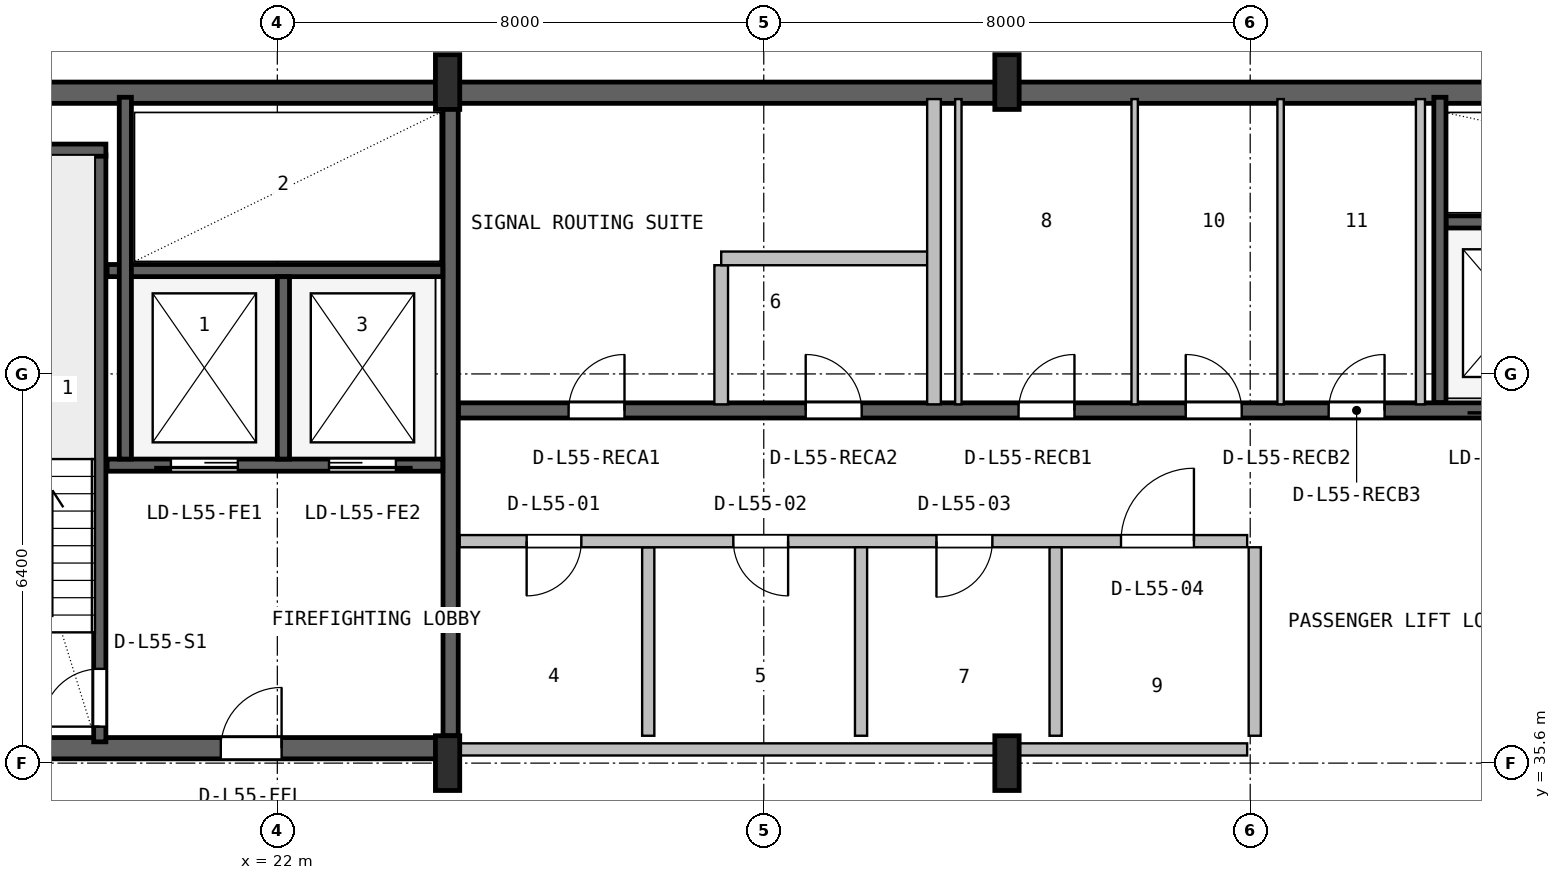
"""IFC4 building model, lengths in metres.
Left out: names, types, materials, properties, quantities, classifications, styles, units other than length and angle.
Written with IfcOpenShell. Run it as: python <this file> out.ifc"""

import sys

from ifc_helpers import new_model, si_unit, direction, frame, frame_2d, origin, origin_2d, place, context, subcontext, project, spatial, rectangle, i_section, extrude, source, transform, mapped, element, fill, save


model = new_model("IFC4")
c1 = context("Model", 3, precision=1e-05, world=origin(), true_north=direction((0.0, 1.0)))
c2 = subcontext(c1, "Body", "Model", "MODEL_VIEW")
j1 = project(units=[si_unit("LENGTHUNIT", "METRE"), si_unit("PLANEANGLEUNIT", "RADIAN")], contexts=[c1])
p1 = place(None, origin())
s1 = spatial("IfcSite", under=j1, at=p1, CompositionType="ELEMENT")
p2 = place(p1, origin())
s2 = spatial("IfcBuilding", under=s1, at=p2, CompositionType="ELEMENT")
p3 = place(p2, frame((0.0, 0.0, 222.6)))
s3 = spatial("IfcBuildingStorey", under=s2, at=p3, CompositionType="ELEMENT", Elevation=222.6)
p4 = place(p3, frame((15.6, 46.625, 0.0), z_axis=(0.0, 0.0, 1.0), x_axis=(1.0, 0.0, 0.0)))
e1 = element("IfcWall", 1, at=p4, inside=s3, PredefinedType="SHEAR", context=c2, shape_type="SweptSolid", body=[
    extrude(rectangle(XDim=36.8, YDim=0.35, at=frame_2d((18.4, 0.0))), origin(), (0.0, 0.0, 1.0), 3.55),
])
p5 = place(p3, frame((15.67, 35.845, 0.0), z_axis=(0.0, 0.0, 1.0), x_axis=(1.0, 0.0, 0.0)))
e2 = element("IfcWall", 2, at=p5, inside=s3, PredefinedType="SHEAR", context=c2, shape_type="SweptSolid", body=[
    extrude(rectangle(XDim=9.13, YDim=0.35, at=frame_2d((4.565, 0.0))), origin(), (0.0, 0.0, 1.0), 3.55),
])
p6 = place(p5, frame((5.4, 0.0, 0.0)))
e3 = element("IfcOpeningElement", 3, at=p6, cuts=e2, PredefinedType="OPENING", context=c2, shape_type="SweptSolid", body=[
    extrude(rectangle(XDim=1.0, YDim=2.1, at=frame_2d((0.5, 1.05))), frame((0.0, 0.185, 0.0), z_axis=(0.0, -1.0, 0.0), x_axis=(1.0, 0.0, 0.0)), (0.0, 0.0, 1.0), 0.37),
])
m1 = source(origin(), c2, "Body", "SweptSolid", [
    extrude(i_section(OverallWidth=0.4, OverallDepth=0.9, WebThickness=0.016, FlangeThickness=0.028, FilletRadius=0.016, at=origin_2d()), origin(), (0.0, 0.0, 1.0), 3.8),
])
for number, where, z_axis, x_axis in (
    (4, (24.8, 35.6, 0.0), (0.0, 0.0, 1.0), (1.0, 0.0, 0.0)),
    (5, (24.8, 46.8, 0.0), (0.0, 0.0, 1.0), (1.0, 0.0, 0.0)),
    (6, (34.0, 35.6, 0.0), (0.0, 0.0, 1.0), (1.0, 0.0, 0.0)),
    (7, (34.0, 46.8, 0.0), (0.0, 0.0, 1.0), (1.0, 0.0, 0.0)),
):
    element("IfcColumn", number, at=place(p3, frame(where, z_axis=z_axis, x_axis=x_axis)), inside=s3, PredefinedType="COLUMN", context=c2, shape_type="MappedRepresentation", body=[
        mapped(m1, transform((0.0, 0.0, 0.0), x_axis=(1.0, 0.0, 0.0), y_axis=(0.0, 1.0, 0.0), z_axis=(0.0, 0.0, 1.0), scale=1.0)),
    ])
p7 = place(p3, frame((19.08, 35.95, 0.0), z_axis=(0.0, 0.0, 1.0), x_axis=(0.0, 1.0, 0.0)))
e8 = element("IfcWall", 8, at=p7, inside=s3, PredefinedType="SHEAR", context=c2, shape_type="SweptSolid", body=[
    extrude(rectangle(XDim=9.65, YDim=0.2, at=frame_2d((4.825, 0.0))), origin(), (0.0, 0.0, 1.0), 3.55),
])
p8 = place(p7, frame((0.25, 0.0, 0.0)))
e9 = element("IfcOpeningElement", 9, at=p8, cuts=e8, PredefinedType="OPENING", context=c2, shape_type="SweptSolid", body=[
    extrude(rectangle(XDim=0.95, YDim=2.1, at=frame_2d((0.475, 1.05))), frame((0.0, 0.11, 0.0), z_axis=(0.0, -1.0, 0.0), x_axis=(1.0, 0.0, 0.0)), (0.0, 0.0, 1.0), 0.22),
])
p9 = place(p3, frame((15.95, 45.68, 0.0), z_axis=(0.0, 0.0, 1.0), x_axis=(1.0, 0.0, 0.0)))
e10 = element("IfcWall", 10, at=p9, inside=s3, PredefinedType="SHEAR", context=c2, shape_type="SweptSolid", body=[
    extrude(rectangle(XDim=3.23, YDim=0.2, at=frame_2d((1.615, 0.0))), origin(), (0.0, 0.0, 1.0), 3.55),
])
p10 = place(p3, frame((24.85, 36.05, 0.0), z_axis=(0.0, 0.0, 1.0), x_axis=(0.0, 1.0, 0.0)))
e11 = element("IfcWall", 11, at=p10, inside=s3, PredefinedType="SHEAR", context=c2, shape_type="SweptSolid", body=[
    extrude(rectangle(XDim=10.45, YDim=0.25, at=frame_2d((5.225, 0.0))), origin(), (0.0, 0.0, 1.0), 3.55),
])
p11 = place(p3, frame((19.2, 40.5, 0.0), z_axis=(0.0, 0.0, 1.0), x_axis=(1.0, 0.0, 0.0)))
e12 = element("IfcWall", 12, at=p11, inside=s3, PredefinedType="SHEAR", context=c2, shape_type="SweptSolid", body=[
    extrude(rectangle(XDim=5.52, YDim=0.2, at=frame_2d((2.76, 0.0))), origin(), (0.0, 0.0, 1.0), 3.55),
])
p12 = place(p11, frame((1.05, 0.0, 0.0)))
e13 = element("IfcOpeningElement", 13, at=p12, cuts=e12, PredefinedType="OPENING", context=c2, shape_type="SweptSolid", body=[
    extrude(rectangle(XDim=1.1, YDim=2.18, at=frame_2d((0.55, 1.09))), frame((0.0, 0.11, 0.0), z_axis=(0.0, -1.0, 0.0), x_axis=(1.0, 0.0, 0.0)), (0.0, 0.0, 1.0), 0.22),
])
p13 = place(p11, frame((3.65, 0.0, 0.0)))
e14 = element("IfcOpeningElement", 14, at=p13, cuts=e12, PredefinedType="OPENING", context=c2, shape_type="SweptSolid", body=[
    extrude(rectangle(XDim=1.1, YDim=2.18, at=frame_2d((0.55, 1.09))), frame((0.0, 0.11, 0.0), z_axis=(0.0, -1.0, 0.0), x_axis=(1.0, 0.0, 0.0)), (0.0, 0.0, 1.0), 0.22),
])
p14 = place(p3, frame((19.2, 43.7, 0.0), z_axis=(0.0, 0.0, 1.0), x_axis=(1.0, 0.0, 0.0)))
e15 = element("IfcWall", 15, at=p14, inside=s3, PredefinedType="SHEAR", context=c2, shape_type="SweptSolid", body=[
    extrude(rectangle(XDim=5.52, YDim=0.2, at=frame_2d((2.76, 0.0))), origin(), (0.0, 0.0, 1.0), 3.55),
])
p15 = place(p3, frame((22.1, 40.6, 0.0), z_axis=(0.0, 0.0, 1.0), x_axis=(0.0, 1.0, 0.0)))
e16 = element("IfcWall", 16, at=p15, inside=s3, PredefinedType="SHEAR", context=c2, shape_type="SweptSolid", body=[
    extrude(rectangle(XDim=3.0, YDim=0.2, at=frame_2d((1.5, 0.0))), origin(), (0.0, 0.0, 1.0), 3.55),
])
p16 = place(p3, frame((19.5, 40.6, 0.0), z_axis=(0.0, 0.0, 1.0), x_axis=(0.0, 1.0, 0.0)))
e17 = element("IfcWall", 17, at=p16, inside=s3, PredefinedType="SHEAR", context=c2, shape_type="SweptSolid", body=[
    extrude(rectangle(XDim=5.95, YDim=0.2, at=frame_2d((2.975, 0.0))), origin(), (0.0, 0.0, 1.0), 3.55),
])
p17 = place(p3, frame((24.98, 41.4, 0.0), z_axis=(0.0, 0.0, 1.0), x_axis=(1.0, 0.0, 0.0)))
e18 = element("IfcWall", 18, at=p17, inside=s3, PredefinedType="SHEAR", context=c2, shape_type="SweptSolid", body=[
    extrude(rectangle(XDim=23.82, YDim=0.25, at=frame_2d((11.91, 0.0))), origin(), (0.0, 0.0, 1.0), 3.55),
])
p18 = place(p17, frame((16.87, 0.0, 0.0)))
e19 = element("IfcOpeningElement", 19, at=p18, cuts=e18, PredefinedType="OPENING", context=c2, shape_type="SweptSolid", body=[
    extrude(rectangle(XDim=1.1, YDim=2.18, at=frame_2d((0.55, 1.09))), frame((0.0, 0.135, 0.0), z_axis=(0.0, -1.0, 0.0), x_axis=(1.0, 0.0, 0.0)), (0.0, 0.0, 1.0), 0.27),
])
p19 = place(p17, frame((19.47, 0.0, 0.0)))
e20 = element("IfcOpeningElement", 20, at=p19, cuts=e18, PredefinedType="OPENING", context=c2, shape_type="SweptSolid", body=[
    extrude(rectangle(XDim=1.1, YDim=2.18, at=frame_2d((0.55, 1.09))), frame((0.0, 0.135, 0.0), z_axis=(0.0, -1.0, 0.0), x_axis=(1.0, 0.0, 0.0)), (0.0, 0.0, 1.0), 0.27),
])
p20 = place(p17, frame((22.07, 0.0, 0.0)))
e21 = element("IfcOpeningElement", 21, at=p20, cuts=e18, PredefinedType="OPENING", context=c2, shape_type="SweptSolid", body=[
    extrude(rectangle(XDim=1.1, YDim=2.18, at=frame_2d((0.55, 1.09))), frame((0.0, 0.135, 0.0), z_axis=(0.0, -1.0, 0.0), x_axis=(1.0, 0.0, 0.0)), (0.0, 0.0, 1.0), 0.27),
])
p21 = place(p17, frame((1.81, 0.0, 0.0)))
e22 = element("IfcOpeningElement", 22, at=p21, cuts=e18, PredefinedType="OPENING", context=c2, shape_type="SweptSolid", body=[
    extrude(rectangle(XDim=0.92, YDim=2.08, at=frame_2d((0.46, 1.04))), frame((0.0, 0.135, 0.0), z_axis=(0.0, -1.0, 0.0), x_axis=(1.0, 0.0, 0.0)), (0.0, 0.0, 1.0), 0.27),
])
p22 = place(p17, frame((5.71, 0.0, 0.0)))
e23 = element("IfcOpeningElement", 23, at=p22, cuts=e18, PredefinedType="OPENING", context=c2, shape_type="SweptSolid", body=[
    extrude(rectangle(XDim=0.92, YDim=2.08, at=frame_2d((0.46, 1.04))), frame((0.0, 0.135, 0.0), z_axis=(0.0, -1.0, 0.0), x_axis=(1.0, 0.0, 0.0)), (0.0, 0.0, 1.0), 0.27),
])
p23 = place(p17, frame((9.21, 0.0, 0.0)))
e24 = element("IfcOpeningElement", 24, at=p23, cuts=e18, PredefinedType="OPENING", context=c2, shape_type="SweptSolid", body=[
    extrude(rectangle(XDim=0.92, YDim=2.08, at=frame_2d((0.46, 1.04))), frame((0.0, 0.135, 0.0), z_axis=(0.0, -1.0, 0.0), x_axis=(1.0, 0.0, 0.0)), (0.0, 0.0, 1.0), 0.27),
])
p24 = place(p17, frame((11.96, 0.0, 0.0)))
e25 = element("IfcOpeningElement", 25, at=p24, cuts=e18, PredefinedType="OPENING", context=c2, shape_type="SweptSolid", body=[
    extrude(rectangle(XDim=0.92, YDim=2.08, at=frame_2d((0.46, 1.04))), frame((0.0, 0.135, 0.0), z_axis=(0.0, -1.0, 0.0), x_axis=(1.0, 0.0, 0.0)), (0.0, 0.0, 1.0), 0.27),
])
p25 = place(p17, frame((14.31, 0.0, 0.0)))
e26 = element("IfcOpeningElement", 26, at=p25, cuts=e18, PredefinedType="OPENING", context=c2, shape_type="SweptSolid", body=[
    extrude(rectangle(XDim=0.92, YDim=2.08, at=frame_2d((0.46, 1.04))), frame((0.0, 0.135, 0.0), z_axis=(0.0, -1.0, 0.0), x_axis=(1.0, 0.0, 0.0)), (0.0, 0.0, 1.0), 0.27),
])
p26 = place(p3, frame((41.22, 44.5, 0.0), z_axis=(0.0, 0.0, 1.0), x_axis=(1.0, 0.0, 0.0)))
e27 = element("IfcWall", 27, at=p26, inside=s3, PredefinedType="SHEAR", context=c2, shape_type="SweptSolid", body=[
    extrude(rectangle(XDim=7.58, YDim=0.2, at=frame_2d((3.79, 0.0))), origin(), (0.0, 0.0, 1.0), 3.55),
])
p27 = place(p3, frame((41.12, 41.53, 0.0), z_axis=(0.0, 0.0, 1.0), x_axis=(0.0, 1.0, 0.0)))
e28 = element("IfcWall", 28, at=p27, inside=s3, PredefinedType="SHEAR", context=c2, shape_type="SweptSolid", body=[
    extrude(rectangle(XDim=5.02, YDim=0.2, at=frame_2d((2.51, 0.0))), origin(), (0.0, 0.0, 1.0), 3.55),
])
p28 = place(p3, frame((25.0, 35.825, 0.0), z_axis=(0.0, 0.0, 1.0), x_axis=(1.0, 0.0, 0.0)))
e29 = element("IfcWall", 29, at=p28, inside=s3, PredefinedType="SOLIDWALL", context=c2, shape_type="SweptSolid", body=[
    extrude(rectangle(XDim=12.95, YDim=0.2, at=frame_2d((6.475, 0.0))), origin(), (0.0, 0.0, 1.0), 2.575),
])
p29 = place(p3, frame((28.1, 36.05, 0.0), z_axis=(0.0, 0.0, 1.0), x_axis=(0.0, 1.0, 0.0)))
e30 = element("IfcWall", 30, at=p29, inside=s3, PredefinedType="PLUMBINGWALL", context=c2, shape_type="SweptSolid", body=[
    extrude(rectangle(XDim=3.1, YDim=0.2, at=frame_2d((1.55, 0.0))), origin(), (0.0, 0.0, 1.0), 3.53),
])
p30 = place(p3, frame((25.0, 39.25, 0.0), z_axis=(0.0, 0.0, 1.0), x_axis=(1.0, 0.0, 0.0)))
e31 = element("IfcWall", 31, at=p30, inside=s3, PredefinedType="SOLIDWALL", context=c2, shape_type="SweptSolid", body=[
    extrude(rectangle(XDim=12.95, YDim=0.2, at=frame_2d((6.475, 0.0))), origin(), (0.0, 0.0, 1.0), 3.53),
])
p31 = place(p30, frame((1.1, 0.0, 0.0)))
e32 = element("IfcOpeningElement", 32, at=p31, cuts=e31, PredefinedType="OPENING", context=c2, shape_type="SweptSolid", body=[
    extrude(rectangle(XDim=0.9, YDim=2.06, at=frame_2d((0.45, 1.03))), frame((0.0, 0.11, 0.0), z_axis=(0.0, -1.0, 0.0), x_axis=(1.0, 0.0, 0.0)), (0.0, 0.0, 1.0), 0.22),
])
p32 = place(p30, frame((4.5, 0.0, 0.0)))
e33 = element("IfcOpeningElement", 33, at=p32, cuts=e31, PredefinedType="OPENING", context=c2, shape_type="SweptSolid", body=[
    extrude(rectangle(XDim=0.9, YDim=2.06, at=frame_2d((0.45, 1.03))), frame((0.0, 0.11, 0.0), z_axis=(0.0, -1.0, 0.0), x_axis=(1.0, 0.0, 0.0)), (0.0, 0.0, 1.0), 0.22),
])
p33 = place(p30, frame((7.84, 0.0, 0.0)))
e34 = element("IfcOpeningElement", 34, at=p33, cuts=e31, PredefinedType="OPENING", context=c2, shape_type="SweptSolid", body=[
    extrude(rectangle(XDim=0.92, YDim=2.08, at=frame_2d((0.46, 1.04))), frame((0.0, 0.11, 0.0), z_axis=(0.0, -1.0, 0.0), x_axis=(1.0, 0.0, 0.0)), (0.0, 0.0, 1.0), 0.22),
])
p34 = place(p30, frame((10.875, 0.0, 0.0)))
e35 = element("IfcOpeningElement", 35, at=p34, cuts=e31, PredefinedType="OPENING", context=c2, shape_type="SweptSolid", body=[
    extrude(rectangle(XDim=1.2, YDim=2.1, at=frame_2d((0.6, 1.05))), frame((0.0, 0.11, 0.0), z_axis=(0.0, -1.0, 0.0), x_axis=(1.0, 0.0, 0.0)), (0.0, 0.0, 1.0), 0.22),
])
p35 = place(p3, frame((31.6, 36.05, 0.0), z_axis=(0.0, 0.0, 1.0), x_axis=(0.0, 1.0, 0.0)))
e36 = element("IfcWall", 36, at=p35, inside=s3, PredefinedType="PLUMBINGWALL", context=c2, shape_type="SweptSolid", body=[
    extrude(rectangle(XDim=3.1, YDim=0.2, at=frame_2d((1.55, 0.0))), origin(), (0.0, 0.0, 1.0), 3.53),
])
for number, where, z_axis, x_axis in (
    (37, (34.8, 36.05, 0.0), (0.0, 0.0, 1.0), (0.0, 1.0, 0.0)),
    (38, (38.075, 36.05, 0.0), (0.0, 0.0, 1.0), (0.0, 1.0, 0.0)),
):
    element("IfcWall", number, at=place(p3, frame(where, z_axis=z_axis, x_axis=x_axis)), inside=s3, PredefinedType="SOLIDWALL", context=c2, shape_type="SweptSolid", body=[
        extrude(rectangle(XDim=3.1, YDim=0.2, at=frame_2d((1.55, 0.0))), origin(), (0.0, 0.0, 1.0), 3.53),
    ])
p36 = place(p3, frame((29.3, 41.5, 0.0), z_axis=(0.0, 0.0, 1.0), x_axis=(0.0, 1.0, 0.0)))
e39 = element("IfcWall", 39, at=p36, inside=s3, PredefinedType="PARTITIONING", context=c2, shape_type="SweptSolid", body=[
    extrude(rectangle(XDim=2.288, YDim=0.225, at=frame_2d((1.144, 0.0))), origin(), (0.0, 0.0, 1.0), 3.53),
])
p37 = place(p3, frame((29.3, 43.9, 0.0), z_axis=(0.0, 0.0, 1.0), x_axis=(1.0, 0.0, 0.0)))
e40 = element("IfcWall", 40, at=p37, inside=s3, PredefinedType="PARTITIONING", context=c2, shape_type="SweptSolid", body=[
    extrude(rectangle(XDim=3.5, YDim=0.225, at=frame_2d((1.75, 0.0))), origin(), (0.0, 0.0, 1.0), 3.53),
])
p38 = place(p3, frame((32.8, 41.5, 0.0), z_axis=(0.0, 0.0, 1.0), x_axis=(0.0, 1.0, 0.0)))
e41 = element("IfcWall", 41, at=p38, inside=s3, PredefinedType="PARTITIONING", context=c2, shape_type="SweptSolid", body=[
    extrude(rectangle(XDim=5.02, YDim=0.225, at=frame_2d((2.51, 0.0))), origin(), (0.0, 0.0, 1.0), 3.53),
])
for number, where, z_axis, x_axis in (
    (42, (36.1, 41.5, 0.0), (0.0, 0.0, 1.0), (0.0, 1.0, 0.0)),
    (43, (33.2, 41.5, 0.0), (0.0, 0.0, 1.0), (0.0, 1.0, 0.0)),
    (44, (38.5, 41.5, 0.0), (0.0, 0.0, 1.0), (0.0, 1.0, 0.0)),
):
    element("IfcWall", number, at=place(p3, frame(where, z_axis=z_axis, x_axis=x_axis)), inside=s3, PredefinedType="PARTITIONING", context=c2, shape_type="SweptSolid", body=[
        extrude(rectangle(XDim=5.02, YDim=0.105, at=frame_2d((2.51, 0.0))), origin(), (0.0, 0.0, 1.0), 3.53),
    ])
p39 = place(p3, frame((40.8, 41.5, 0.0), z_axis=(0.0, 0.0, 1.0), x_axis=(0.0, 1.0, 0.0)))
e45 = element("IfcWall", 45, at=p39, inside=s3, PredefinedType="PARTITIONING", context=c2, shape_type="SweptSolid", body=[
    extrude(rectangle(XDim=5.02, YDim=0.15, at=frame_2d((2.51, 0.0))), origin(), (0.0, 0.0, 1.0), 3.53),
])
m2 = source(origin(), c2, "Body", "SweptSolid", [
    extrude(rectangle(XDim=0.95, YDim=2.1, at=frame_2d((0.475, 1.05))), frame((0.0, 0.025, 0.0), z_axis=(0.0, -1.0, 0.0), x_axis=(1.0, 0.0, 0.0)), (0.0, 0.0, 1.0), 0.05),
])
p40 = place(p8, origin())
e46 = element("IfcDoor", 46, at=p40, inside=s3, OperationType="SINGLE_SWING_LEFT", PredefinedType="DOOR", context=c2, shape_type="MappedRepresentation", body=[
    mapped(m2, transform((0.0, 0.0, 0.0), x_axis=(1.0, 0.0, 0.0), y_axis=(0.0, 1.0, 0.0), z_axis=(0.0, 0.0, 1.0), scale=1.0)),
])
fill(e9, e46)
m3 = source(origin(), c2, "Body", "SweptSolid", [
    extrude(rectangle(XDim=1.0, YDim=2.1, at=frame_2d((0.5, 1.05))), frame((0.0, 0.025, 0.0), z_axis=(0.0, -1.0, 0.0), x_axis=(1.0, 0.0, 0.0)), (0.0, 0.0, 1.0), 0.05),
])
p41 = place(p6, origin())
e47 = element("IfcDoor", 47, at=p41, inside=s3, OperationType="SINGLE_SWING_RIGHT", PredefinedType="DOOR", context=c2, shape_type="MappedRepresentation", body=[
    mapped(m3, transform((0.0, 0.0, 0.0), x_axis=(1.0, 0.0, 0.0), y_axis=(0.0, 1.0, 0.0), z_axis=(0.0, 0.0, 1.0), scale=1.0)),
])
fill(e3, e47)
m4 = source(origin(), c2, "Body", "SweptSolid", [
    extrude(rectangle(XDim=1.1, YDim=2.18, at=frame_2d((0.55, 1.09))), frame((0.0, 0.025, 0.0), z_axis=(0.0, -1.0, 0.0), x_axis=(1.0, 0.0, 0.0)), (0.0, 0.0, 1.0), 0.05),
])
p42 = place(p12, frame((1.1, 0.0, 0.0), z_axis=(0.0, 0.0, 1.0), x_axis=(-1.0, 0.0, 0.0)))
e48 = element("IfcDoor", 48, at=p42, inside=s3, OperationType="SLIDING_TO_LEFT", PredefinedType="DOOR", context=c2, shape_type="MappedRepresentation", body=[
    mapped(m4, transform((0.0, 0.0, 0.0), x_axis=(1.0, 0.0, 0.0), y_axis=(0.0, 1.0, 0.0), z_axis=(0.0, 0.0, 1.0), scale=1.0)),
])
fill(e13, e48)
p43 = place(p13, frame((1.1, 0.0, 0.0), z_axis=(0.0, 0.0, 1.0), x_axis=(-1.0, 0.0, 0.0)))
e49 = element("IfcDoor", 49, at=p43, inside=s3, OperationType="SLIDING_TO_RIGHT", PredefinedType="DOOR", context=c2, shape_type="MappedRepresentation", body=[
    mapped(m4, transform((0.0, 0.0, 0.0), x_axis=(1.0, 0.0, 0.0), y_axis=(0.0, 1.0, 0.0), z_axis=(0.0, 0.0, 1.0), scale=1.0)),
])
fill(e14, e49)
m5 = source(origin(), c2, "Body", "SweptSolid", [
    extrude(rectangle(XDim=0.92, YDim=2.08, at=frame_2d((0.46, 1.04))), frame((0.0, 0.025, 0.0), z_axis=(0.0, -1.0, 0.0), x_axis=(1.0, 0.0, 0.0)), (0.0, 0.0, 1.0), 0.05),
])
p44 = place(p21, origin())
e50 = element("IfcDoor", 50, at=p44, inside=s3, OperationType="SINGLE_SWING_RIGHT", PredefinedType="DOOR", context=c2, shape_type="MappedRepresentation", body=[
    mapped(m5, transform((0.0, 0.0, 0.0), x_axis=(1.0, 0.0, 0.0), y_axis=(0.0, 1.0, 0.0), z_axis=(0.0, 0.0, 1.0), scale=1.0)),
])
fill(e22, e50)
p45 = place(p22, origin())
e51 = element("IfcDoor", 51, at=p45, inside=s3, OperationType="SINGLE_SWING_LEFT", PredefinedType="DOOR", context=c2, shape_type="MappedRepresentation", body=[
    mapped(m5, transform((0.0, 0.0, 0.0), x_axis=(1.0, 0.0, 0.0), y_axis=(0.0, 1.0, 0.0), z_axis=(0.0, 0.0, 1.0), scale=1.0)),
])
fill(e23, e51)
p46 = place(p23, origin())
e52 = element("IfcDoor", 52, at=p46, inside=s3, OperationType="SINGLE_SWING_RIGHT", PredefinedType="DOOR", context=c2, shape_type="MappedRepresentation", body=[
    mapped(m5, transform((0.0, 0.0, 0.0), x_axis=(1.0, 0.0, 0.0), y_axis=(0.0, 1.0, 0.0), z_axis=(0.0, 0.0, 1.0), scale=1.0)),
])
fill(e24, e52)
p47 = place(p24, origin())
e53 = element("IfcDoor", 53, at=p47, inside=s3, OperationType="SINGLE_SWING_LEFT", PredefinedType="DOOR", context=c2, shape_type="MappedRepresentation", body=[
    mapped(m5, transform((0.0, 0.0, 0.0), x_axis=(1.0, 0.0, 0.0), y_axis=(0.0, 1.0, 0.0), z_axis=(0.0, 0.0, 1.0), scale=1.0)),
])
fill(e25, e53)
p48 = place(p25, origin())
e54 = element("IfcDoor", 54, at=p48, inside=s3, OperationType="SINGLE_SWING_RIGHT", PredefinedType="DOOR", context=c2, shape_type="MappedRepresentation", body=[
    mapped(m5, transform((0.0, 0.0, 0.0), x_axis=(1.0, 0.0, 0.0), y_axis=(0.0, 1.0, 0.0), z_axis=(0.0, 0.0, 1.0), scale=1.0)),
])
fill(e26, e54)
m6 = source(origin(), c2, "Body", "SweptSolid", [
    extrude(rectangle(XDim=0.9, YDim=2.06, at=frame_2d((0.45, 1.03))), frame((0.0, 0.025, 0.0), z_axis=(0.0, -1.0, 0.0), x_axis=(1.0, 0.0, 0.0)), (0.0, 0.0, 1.0), 0.05),
])
p49 = place(p31, frame((0.9, 0.0, 0.0), z_axis=(0.0, 0.0, 1.0), x_axis=(-1.0, 0.0, 0.0)))
e55 = element("IfcDoor", 55, at=p49, inside=s3, OperationType="SINGLE_SWING_LEFT", PredefinedType="DOOR", context=c2, shape_type="MappedRepresentation", body=[
    mapped(m6, transform((0.0, 0.0, 0.0), x_axis=(1.0, 0.0, 0.0), y_axis=(0.0, 1.0, 0.0), z_axis=(0.0, 0.0, 1.0), scale=1.0)),
])
fill(e32, e55)
p50 = place(p32, frame((0.9, 0.0, 0.0), z_axis=(0.0, 0.0, 1.0), x_axis=(-1.0, 0.0, 0.0)))
e56 = element("IfcDoor", 56, at=p50, inside=s3, OperationType="SINGLE_SWING_RIGHT", PredefinedType="DOOR", context=c2, shape_type="MappedRepresentation", body=[
    mapped(m6, transform((0.0, 0.0, 0.0), x_axis=(1.0, 0.0, 0.0), y_axis=(0.0, 1.0, 0.0), z_axis=(0.0, 0.0, 1.0), scale=1.0)),
])
fill(e33, e56)
p51 = place(p33, frame((0.92, 0.0, 0.0), z_axis=(0.0, 0.0, 1.0), x_axis=(-1.0, 0.0, 0.0)))
e57 = element("IfcDoor", 57, at=p51, inside=s3, OperationType="SINGLE_SWING_LEFT", PredefinedType="DOOR", context=c2, shape_type="MappedRepresentation", body=[
    mapped(m5, transform((0.0, 0.0, 0.0), x_axis=(1.0, 0.0, 0.0), y_axis=(0.0, 1.0, 0.0), z_axis=(0.0, 0.0, 1.0), scale=1.0)),
])
fill(e34, e57)
m7 = source(origin(), c2, "Body", "SweptSolid", [
    extrude(rectangle(XDim=1.2, YDim=2.1, at=frame_2d((0.6, 1.05))), frame((0.0, 0.025, 0.0), z_axis=(0.0, -1.0, 0.0), x_axis=(1.0, 0.0, 0.0)), (0.0, 0.0, 1.0), 0.05),
])
p52 = place(p34, origin())
e58 = element("IfcDoor", 58, at=p52, inside=s3, OperationType="SINGLE_SWING_RIGHT", PredefinedType="DOOR", context=c2, shape_type="MappedRepresentation", body=[
    mapped(m7, transform((0.0, 0.0, 0.0), x_axis=(1.0, 0.0, 0.0), y_axis=(0.0, 1.0, 0.0), z_axis=(0.0, 0.0, 1.0), scale=1.0)),
])
fill(e35, e58)
save(model, sys.argv[1])
